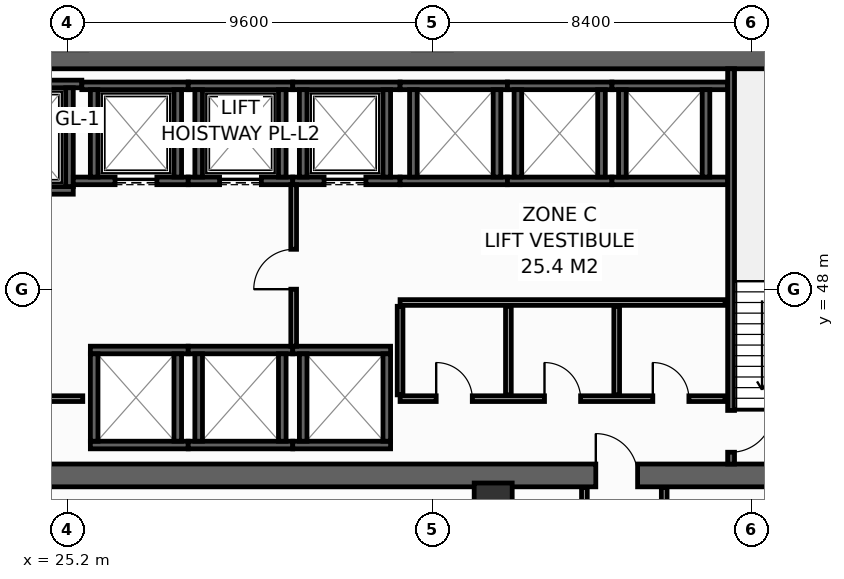
"""IFC4 building model, lengths in metres.
Left out: names, types, materials, properties, quantities, classifications, styles, units other than length and angle.
Written with IfcOpenShell. Run it as: python <this file> out.ifc"""

import sys

from ifc_helpers import new_model, si_unit, direction, frame, frame_2d, origin, origin_2d, place, context, subcontext, project, spatial, rectangle, hollow_rectangle, extrude, element, fill, save


model = new_model("IFC4")
c1 = context("Model", 3, precision=1e-05, world=origin(), true_north=direction((0.0, 1.0)))
c2 = subcontext(c1, "Body", "Model", "MODEL_VIEW")
j1 = project(units=[si_unit("LENGTHUNIT", "METRE"), si_unit("PLANEANGLEUNIT", "RADIAN")], contexts=[c1])
p1 = place(None, origin())
s1 = spatial("IfcSite", under=j1, at=p1, CompositionType="ELEMENT")
p2 = place(p1, origin())
s2 = spatial("IfcBuilding", under=s1, at=p2, CompositionType="ELEMENT")
p3 = place(p2, frame((0.0, 0.0, 110.4)))
s3 = spatial("IfcBuildingStorey", under=s2, at=p3, CompositionType="ELEMENT", Elevation=110.4)
p4 = place(p3, frame((13.5, 43.1, 0.0), z_axis=(0.0, 0.0, 1.0), x_axis=(1.0, 0.0, 0.0)))
e1 = element("IfcWall", 1, at=p4, inside=s3, PredefinedType="SHEAR", context=c2, shape_type="SweptSolid", body=[
    extrude(rectangle(XDim=32.9, YDim=0.6, at=frame_2d((16.45, 0.0))), origin(), (0.0, 0.0, 1.0), 4.15),
])
p5 = place(p4, frame((5.4, 0.0, 0.0)))
e2 = element("IfcOpeningElement", 2, at=p5, cuts=e1, PredefinedType="OPENING", context=c2, shape_type="SweptSolid", body=[
    extrude(rectangle(XDim=1.1, YDim=2.15, at=frame_2d((0.55, 1.075))), frame((0.0, 0.31, 0.0), z_axis=(0.0, -1.0, 0.0), x_axis=(1.0, 0.0, 0.0)), (0.0, 0.0, 1.0), 0.62),
])
p6 = place(p4, frame((25.6, 0.0, 0.0)))
e3 = element("IfcOpeningElement", 3, at=p6, cuts=e1, PredefinedType="OPENING", context=c2, shape_type="SweptSolid", body=[
    extrude(rectangle(XDim=1.1, YDim=2.15, at=frame_2d((0.55, 1.075))), frame((0.0, 0.31, 0.0), z_axis=(0.0, -1.0, 0.0), x_axis=(1.0, 0.0, 0.0)), (0.0, 0.0, 1.0), 0.62),
])
p7 = place(p3, frame((13.5, 54.1, 0.0), z_axis=(0.0, 0.0, 1.0), x_axis=(1.0, 0.0, 0.0)))
e4 = element("IfcWall", 4, at=p7, inside=s3, PredefinedType="SHEAR", context=c2, shape_type="SweptSolid", body=[
    extrude(rectangle(XDim=32.9, YDim=0.6, at=frame_2d((16.45, 0.0))), origin(), (0.0, 0.0, 1.0), 4.15),
])
p8 = place(p3, frame((36.4, 42.4, 0.0), z_axis=(0.0, 0.0, 1.0), x_axis=(1.0, 0.0, 0.0)))
e5 = element("IfcColumn", 5, at=p8, inside=s3, PredefinedType="COLUMN", context=c2, shape_type="SweptSolid", body=[
    extrude(hollow_rectangle(XDim=1.0, YDim=1.0, WallThickness=0.045, at=origin_2d()), origin(), (0.0, 0.0, 1.0), 4.4),
])
p9 = place(p3, frame((22.5, 50.6, 0.0), z_axis=(0.0, 0.0, 1.0), x_axis=(1.0, 0.0, 0.0)))
e6 = element("IfcWall", 6, at=p9, inside=s3, PredefinedType="SHEAR", context=c2, shape_type="SweptSolid", body=[
    extrude(rectangle(XDim=2.85, YDim=0.2, at=frame_2d((1.425, 0.0))), origin(), (0.0, 0.0, 1.0), 4.15),
])
p10 = place(p9, frame((0.925, 0.0, 0.0)))
e7 = element("IfcOpeningElement", 7, at=p10, cuts=e6, PredefinedType="OPENING", context=c2, shape_type="SweptSolid", body=[
    extrude(rectangle(XDim=1.25, YDim=2.3, at=frame_2d((0.625, 1.15))), frame((0.0, 0.11, 0.0), z_axis=(0.0, -1.0, 0.0), x_axis=(1.0, 0.0, 0.0)), (0.0, 0.0, 1.0), 0.22),
])
p11 = place(p3, frame((22.5, 53.4, 0.0), z_axis=(0.0, 0.0, 1.0), x_axis=(1.0, 0.0, 0.0)))
e8 = element("IfcWall", 8, at=p11, inside=s3, PredefinedType="SHEAR", context=c2, shape_type="SweptSolid", body=[
    extrude(rectangle(XDim=3.075, YDim=0.2, at=frame_2d((1.538, 0.0))), origin(), (0.0, 0.0, 1.0), 4.15),
])
p12 = place(p3, frame((25.25, 50.7, 0.0), z_axis=(0.0, 0.0, 1.0), x_axis=(0.0, 1.0, 0.0)))
e9 = element("IfcWall", 9, at=p12, inside=s3, PredefinedType="SHEAR", context=c2, shape_type="SweptSolid", body=[
    extrude(rectangle(XDim=2.6, YDim=0.2, at=frame_2d((1.3, 0.0))), origin(), (0.0, 0.0, 1.0), 4.15),
])
p13 = place(p3, frame((25.35, 50.85, 0.0), z_axis=(0.0, 0.0, 1.0), x_axis=(1.0, 0.0, 0.0)))
e10 = element("IfcWall", 10, at=p13, inside=s3, PredefinedType="SHEAR", context=c2, shape_type="SweptSolid", body=[
    extrude(rectangle(XDim=3.025, YDim=0.2, at=frame_2d((1.512, 0.0))), origin(), (0.0, 0.0, 1.0), 4.15),
])
p14 = place(p13, frame((1.1, 0.0, 0.0)))
e11 = element("IfcOpeningElement", 11, at=p14, cuts=e10, PredefinedType="OPENING", context=c2, shape_type="SweptSolid", body=[
    extrude(rectangle(XDim=1.1, YDim=2.2, at=frame_2d((0.55, 1.1))), frame((0.0, 0.11, 0.0), z_axis=(0.0, -1.0, 0.0), x_axis=(1.0, 0.0, 0.0)), (0.0, 0.0, 1.0), 0.22),
])
p15 = place(p3, frame((25.575, 53.35, 0.0), z_axis=(0.0, 0.0, 1.0), x_axis=(1.0, 0.0, 0.0)))
e12 = element("IfcWall", 12, at=p15, inside=s3, PredefinedType="SHEAR", context=c2, shape_type="SweptSolid", body=[
    extrude(rectangle(XDim=2.8, YDim=0.2, at=frame_2d((1.4, 0.0))), origin(), (0.0, 0.0, 1.0), 4.15),
])
for number, where, z_axis, x_axis in (
    (13, (25.9, 50.95, 0.0), (0.0, 0.0, 1.0), (0.0, 1.0, 0.0)),
    (14, (28.1, 50.95, 0.0), (0.0, 0.0, 1.0), (0.0, 1.0, 0.0)),
):
    element("IfcWall", number, at=place(p3, frame(where, z_axis=z_axis, x_axis=x_axis)), inside=s3, PredefinedType="SHEAR", context=c2, shape_type="SweptSolid", body=[
        extrude(rectangle(XDim=2.3, YDim=0.2, at=frame_2d((1.15, 0.0))), origin(), (0.0, 0.0, 1.0), 4.15),
    ])
p16 = place(p3, frame((28.375, 50.85, 0.0), z_axis=(0.0, 0.0, 1.0), x_axis=(1.0, 0.0, 0.0)))
e15 = element("IfcWall", 15, at=p16, inside=s3, PredefinedType="SHEAR", context=c2, shape_type="SweptSolid", body=[
    extrude(rectangle(XDim=2.75, YDim=0.2, at=frame_2d((1.375, 0.0))), origin(), (0.0, 0.0, 1.0), 4.15),
])
p17 = place(p16, frame((0.825, 0.0, 0.0)))
e16 = element("IfcOpeningElement", 16, at=p17, cuts=e15, PredefinedType="OPENING", context=c2, shape_type="SweptSolid", body=[
    extrude(rectangle(XDim=1.1, YDim=2.2, at=frame_2d((0.55, 1.1))), frame((0.0, 0.11, 0.0), z_axis=(0.0, -1.0, 0.0), x_axis=(1.0, 0.0, 0.0)), (0.0, 0.0, 1.0), 0.22),
])
p18 = place(p3, frame((28.375, 53.35, 0.0), z_axis=(0.0, 0.0, 1.0), x_axis=(1.0, 0.0, 0.0)))
e17 = element("IfcWall", 17, at=p18, inside=s3, PredefinedType="SHEAR", context=c2, shape_type="SweptSolid", body=[
    extrude(rectangle(XDim=2.75, YDim=0.2, at=frame_2d((1.375, 0.0))), origin(), (0.0, 0.0, 1.0), 4.15),
])
for number, where, z_axis, x_axis in (
    (18, (28.65, 50.95, 0.0), (0.0, 0.0, 1.0), (0.0, 1.0, 0.0)),
    (19, (30.85, 50.95, 0.0), (0.0, 0.0, 1.0), (0.0, 1.0, 0.0)),
):
    element("IfcWall", number, at=place(p3, frame(where, z_axis=z_axis, x_axis=x_axis)), inside=s3, PredefinedType="SHEAR", context=c2, shape_type="SweptSolid", body=[
        extrude(rectangle(XDim=2.3, YDim=0.2, at=frame_2d((1.15, 0.0))), origin(), (0.0, 0.0, 1.0), 4.15),
    ])
p19 = place(p3, frame((31.125, 50.85, 0.0), z_axis=(0.0, 0.0, 1.0), x_axis=(1.0, 0.0, 0.0)))
e20 = element("IfcWall", 20, at=p19, inside=s3, PredefinedType="SHEAR", context=c2, shape_type="SweptSolid", body=[
    extrude(rectangle(XDim=2.825, YDim=0.2, at=frame_2d((1.413, 0.0))), origin(), (0.0, 0.0, 1.0), 4.15),
])
p20 = place(p19, frame((0.825, 0.0, 0.0)))
e21 = element("IfcOpeningElement", 21, at=p20, cuts=e20, PredefinedType="OPENING", context=c2, shape_type="SweptSolid", body=[
    extrude(rectangle(XDim=1.1, YDim=2.2, at=frame_2d((0.55, 1.1))), frame((0.0, 0.11, 0.0), z_axis=(0.0, -1.0, 0.0), x_axis=(1.0, 0.0, 0.0)), (0.0, 0.0, 1.0), 0.22),
])
p21 = place(p3, frame((31.125, 53.35, 0.0), z_axis=(0.0, 0.0, 1.0), x_axis=(1.0, 0.0, 0.0)))
e22 = element("IfcWall", 22, at=p21, inside=s3, PredefinedType="SHEAR", context=c2, shape_type="SweptSolid", body=[
    extrude(rectangle(XDim=2.825, YDim=0.2, at=frame_2d((1.413, 0.0))), origin(), (0.0, 0.0, 1.0), 4.15),
])
for number, where, z_axis, x_axis in (
    (23, (31.4, 50.95, 0.0), (0.0, 0.0, 1.0), (0.0, 1.0, 0.0)),
    (24, (33.6, 50.95, 0.0), (0.0, 0.0, 1.0), (0.0, 1.0, 0.0)),
):
    element("IfcWall", number, at=place(p3, frame(where, z_axis=z_axis, x_axis=x_axis)), inside=s3, PredefinedType="SHEAR", context=c2, shape_type="SweptSolid", body=[
        extrude(rectangle(XDim=2.3, YDim=0.2, at=frame_2d((1.15, 0.0))), origin(), (0.0, 0.0, 1.0), 4.15),
    ])
for number, where, z_axis, x_axis in (
    (25, (25.8, 43.9, 0.0), (0.0, 0.0, 1.0), (1.0, 0.0, 0.0)),
    (26, (25.8, 46.4, 0.0), (0.0, 0.0, 1.0), (1.0, 0.0, 0.0)),
):
    element("IfcWall", number, at=place(p3, frame(where, z_axis=z_axis, x_axis=x_axis)), inside=s3, PredefinedType="SHEAR", context=c2, shape_type="SweptSolid", body=[
        extrude(rectangle(XDim=2.575, YDim=0.2, at=frame_2d((1.288, 0.0))), origin(), (0.0, 0.0, 1.0), 4.15),
    ])
for number, where, z_axis, x_axis in (
    (27, (25.9, 44.0, 0.0), (0.0, 0.0, 1.0), (0.0, 1.0, 0.0)),
    (28, (28.1, 44.0, 0.0), (0.0, 0.0, 1.0), (0.0, 1.0, 0.0)),
):
    element("IfcWall", number, at=place(p3, frame(where, z_axis=z_axis, x_axis=x_axis)), inside=s3, PredefinedType="SHEAR", context=c2, shape_type="SweptSolid", body=[
        extrude(rectangle(XDim=2.3, YDim=0.2, at=frame_2d((1.15, 0.0))), origin(), (0.0, 0.0, 1.0), 4.15),
    ])
for number, where, z_axis, x_axis in (
    (29, (28.375, 43.9, 0.0), (0.0, 0.0, 1.0), (1.0, 0.0, 0.0)),
    (30, (28.375, 46.4, 0.0), (0.0, 0.0, 1.0), (1.0, 0.0, 0.0)),
):
    element("IfcWall", number, at=place(p3, frame(where, z_axis=z_axis, x_axis=x_axis)), inside=s3, PredefinedType="SHEAR", context=c2, shape_type="SweptSolid", body=[
        extrude(rectangle(XDim=2.75, YDim=0.2, at=frame_2d((1.375, 0.0))), origin(), (0.0, 0.0, 1.0), 4.15),
    ])
for number, where, z_axis, x_axis in (
    (31, (28.65, 44.0, 0.0), (0.0, 0.0, 1.0), (0.0, 1.0, 0.0)),
    (32, (30.85, 44.0, 0.0), (0.0, 0.0, 1.0), (0.0, 1.0, 0.0)),
):
    element("IfcWall", number, at=place(p3, frame(where, z_axis=z_axis, x_axis=x_axis)), inside=s3, PredefinedType="SHEAR", context=c2, shape_type="SweptSolid", body=[
        extrude(rectangle(XDim=2.3, YDim=0.2, at=frame_2d((1.15, 0.0))), origin(), (0.0, 0.0, 1.0), 4.15),
    ])
for number, where, z_axis, x_axis in (
    (33, (31.125, 43.9, 0.0), (0.0, 0.0, 1.0), (1.0, 0.0, 0.0)),
    (34, (31.125, 46.4, 0.0), (0.0, 0.0, 1.0), (1.0, 0.0, 0.0)),
):
    element("IfcWall", number, at=place(p3, frame(where, z_axis=z_axis, x_axis=x_axis)), inside=s3, PredefinedType="SHEAR", context=c2, shape_type="SweptSolid", body=[
        extrude(rectangle(XDim=2.575, YDim=0.2, at=frame_2d((1.288, 0.0))), origin(), (0.0, 0.0, 1.0), 4.15),
    ])
for number, where, z_axis, x_axis in (
    (35, (31.4, 44.0, 0.0), (0.0, 0.0, 1.0), (0.0, 1.0, 0.0)),
    (36, (33.6, 44.0, 0.0), (0.0, 0.0, 1.0), (0.0, 1.0, 0.0)),
):
    element("IfcWall", number, at=place(p3, frame(where, z_axis=z_axis, x_axis=x_axis)), inside=s3, PredefinedType="SHEAR", context=c2, shape_type="SweptSolid", body=[
        extrude(rectangle(XDim=2.3, YDim=0.2, at=frame_2d((1.15, 0.0))), origin(), (0.0, 0.0, 1.0), 4.15),
    ])
for number, where, z_axis, x_axis in (
    (37, (33.95, 50.85, 0.0), (0.0, 0.0, 1.0), (1.0, 0.0, 0.0)),
    (38, (33.95, 53.35, 0.0), (0.0, 0.0, 1.0), (1.0, 0.0, 0.0)),
):
    element("IfcWall", number, at=place(p3, frame(where, z_axis=z_axis, x_axis=x_axis)), inside=s3, PredefinedType="SHEAR", context=c2, shape_type="SweptSolid", body=[
        extrude(rectangle(XDim=2.825, YDim=0.2, at=frame_2d((1.413, 0.0))), origin(), (0.0, 0.0, 1.0), 4.15),
    ])
for number, where, z_axis, x_axis in (
    (39, (34.3, 50.95, 0.0), (0.0, 0.0, 1.0), (0.0, 1.0, 0.0)),
    (40, (36.5, 50.95, 0.0), (0.0, 0.0, 1.0), (0.0, 1.0, 0.0)),
):
    element("IfcWall", number, at=place(p3, frame(where, z_axis=z_axis, x_axis=x_axis)), inside=s3, PredefinedType="SHEAR", context=c2, shape_type="SweptSolid", body=[
        extrude(rectangle(XDim=2.3, YDim=0.2, at=frame_2d((1.15, 0.0))), origin(), (0.0, 0.0, 1.0), 4.15),
    ])
for number, where, z_axis, x_axis in (
    (41, (36.775, 50.85, 0.0), (0.0, 0.0, 1.0), (1.0, 0.0, 0.0)),
    (42, (36.775, 53.35, 0.0), (0.0, 0.0, 1.0), (1.0, 0.0, 0.0)),
):
    element("IfcWall", number, at=place(p3, frame(where, z_axis=z_axis, x_axis=x_axis)), inside=s3, PredefinedType="SHEAR", context=c2, shape_type="SweptSolid", body=[
        extrude(rectangle(XDim=2.75, YDim=0.2, at=frame_2d((1.375, 0.0))), origin(), (0.0, 0.0, 1.0), 4.15),
    ])
for number, where, z_axis, x_axis in (
    (43, (37.05, 50.95, 0.0), (0.0, 0.0, 1.0), (0.0, 1.0, 0.0)),
    (44, (39.25, 50.95, 0.0), (0.0, 0.0, 1.0), (0.0, 1.0, 0.0)),
):
    element("IfcWall", number, at=place(p3, frame(where, z_axis=z_axis, x_axis=x_axis)), inside=s3, PredefinedType="SHEAR", context=c2, shape_type="SweptSolid", body=[
        extrude(rectangle(XDim=2.3, YDim=0.2, at=frame_2d((1.15, 0.0))), origin(), (0.0, 0.0, 1.0), 4.15),
    ])
for number, where, z_axis, x_axis in (
    (45, (39.525, 50.85, 0.0), (0.0, 0.0, 1.0), (1.0, 0.0, 0.0)),
    (46, (39.525, 53.35, 0.0), (0.0, 0.0, 1.0), (1.0, 0.0, 0.0)),
):
    element("IfcWall", number, at=place(p3, frame(where, z_axis=z_axis, x_axis=x_axis)), inside=s3, PredefinedType="SHEAR", context=c2, shape_type="SweptSolid", body=[
        extrude(rectangle(XDim=3.045, YDim=0.2, at=frame_2d((1.522, 0.0))), origin(), (0.0, 0.0, 1.0), 4.15),
    ])
for number, where, z_axis, x_axis in (
    (47, (39.8, 50.95, 0.0), (0.0, 0.0, 1.0), (0.0, 1.0, 0.0)),
    (48, (42.0, 50.95, 0.0), (0.0, 0.0, 1.0), (0.0, 1.0, 0.0)),
):
    element("IfcWall", number, at=place(p3, frame(where, z_axis=z_axis, x_axis=x_axis)), inside=s3, PredefinedType="SHEAR", context=c2, shape_type="SweptSolid", body=[
        extrude(rectangle(XDim=2.3, YDim=0.2, at=frame_2d((1.15, 0.0))), origin(), (0.0, 0.0, 1.0), 4.15),
    ])
p22 = place(p3, frame((42.66, 53.8, 0.0), z_axis=(0.0, 0.0, 1.0), x_axis=(0.0, -1.0, 0.0)))
e49 = element("IfcWall", 49, at=p22, inside=s3, PredefinedType="SHEAR", context=c2, shape_type="SweptSolid", body=[
    extrude(rectangle(XDim=10.4, YDim=0.18, at=frame_2d((5.2, 0.0))), origin(), (0.0, 0.0, 1.0), 4.15),
])
p23 = place(p22, frame((8.99, 0.0, 0.0)))
e50 = element("IfcOpeningElement", 50, at=p23, cuts=e49, PredefinedType="OPENING", context=c2, shape_type="SweptSolid", body=[
    extrude(rectangle(XDim=1.1, YDim=2.15, at=frame_2d((0.55, 1.075))), frame((0.0, 0.1, 0.0), z_axis=(0.0, -1.0, 0.0), x_axis=(1.0, 0.0, 0.0)), (0.0, 0.0, 1.0), 0.2),
])
p24 = place(p3, frame((22.68, 45.12, 0.0), z_axis=(0.0, 0.0, 1.0), x_axis=(1.0, 0.0, 0.0)))
e51 = element("IfcWall", 51, at=p24, inside=s3, PredefinedType="PARTITIONING", context=c2, shape_type="SweptSolid", body=[
    extrude(rectangle(XDim=2.92, YDim=0.15, at=frame_2d((1.46, 0.0))), origin(), (0.0, 0.0, 1.0), 4.15),
])
p25 = place(p24, frame((0.85, 0.0, 0.0)))
e52 = element("IfcOpeningElement", 52, at=p25, cuts=e51, PredefinedType="OPENING", context=c2, shape_type="SweptSolid", body=[
    extrude(rectangle(XDim=1.1, YDim=2.15, at=frame_2d((0.55, 1.075))), frame((0.0, 0.085, 0.0), z_axis=(0.0, -1.0, 0.0), x_axis=(1.0, 0.0, 0.0)), (0.0, 0.0, 1.0), 0.17),
])
p26 = place(p3, frame((31.15, 46.5, 0.0), z_axis=(0.0, 0.0, 1.0), x_axis=(0.0, 1.0, 0.0)))
e53 = element("IfcWall", 53, at=p26, inside=s3, PredefinedType="PARTITIONING", context=c2, shape_type="SweptSolid", body=[
    extrude(rectangle(XDim=4.25, YDim=0.15, at=frame_2d((2.125, 0.0))), origin(), (0.0, 0.0, 1.0), 4.15),
])
p27 = place(p26, frame((1.5, 0.0, 0.0)))
e54 = element("IfcOpeningElement", 54, at=p27, cuts=e53, PredefinedType="OPENING", context=c2, shape_type="SweptSolid", body=[
    extrude(rectangle(XDim=1.05, YDim=2.15, at=frame_2d((0.525, 1.075))), frame((0.0, 0.085, 0.0), z_axis=(0.0, -1.0, 0.0), x_axis=(1.0, 0.0, 0.0)), (0.0, 0.0, 1.0), 0.17),
])
p28 = place(p3, frame((33.95, 45.12, 0.0), z_axis=(0.0, 0.0, 1.0), x_axis=(1.0, 0.0, 0.0)))
e55 = element("IfcWall", 55, at=p28, inside=s3, PredefinedType="PARTITIONING", context=c2, shape_type="SweptSolid", body=[
    extrude(rectangle(XDim=8.55, YDim=0.15, at=frame_2d((4.275, 0.0))), origin(), (0.0, 0.0, 1.0), 4.15),
])
p29 = place(p28, frame((0.95, 0.0, 0.0)))
e56 = element("IfcOpeningElement", 56, at=p29, cuts=e55, PredefinedType="OPENING", context=c2, shape_type="SweptSolid", body=[
    extrude(rectangle(XDim=0.95, YDim=2.15, at=frame_2d((0.475, 1.075))), frame((0.0, 0.085, 0.0), z_axis=(0.0, -1.0, 0.0), x_axis=(1.0, 0.0, 0.0)), (0.0, 0.0, 1.0), 0.17),
])
p30 = place(p28, frame((3.8, 0.0, 0.0)))
e57 = element("IfcOpeningElement", 57, at=p30, cuts=e55, PredefinedType="OPENING", context=c2, shape_type="SweptSolid", body=[
    extrude(rectangle(XDim=0.95, YDim=2.15, at=frame_2d((0.475, 1.075))), frame((0.0, 0.085, 0.0), z_axis=(0.0, -1.0, 0.0), x_axis=(1.0, 0.0, 0.0)), (0.0, 0.0, 1.0), 0.17),
])
p31 = place(p28, frame((6.65, 0.0, 0.0)))
e58 = element("IfcOpeningElement", 58, at=p31, cuts=e55, PredefinedType="OPENING", context=c2, shape_type="SweptSolid", body=[
    extrude(rectangle(XDim=0.95, YDim=2.15, at=frame_2d((0.475, 1.075))), frame((0.0, 0.085, 0.0), z_axis=(0.0, -1.0, 0.0), x_axis=(1.0, 0.0, 0.0)), (0.0, 0.0, 1.0), 0.17),
])
p32 = place(p3, frame((33.95, 47.65, 0.0), z_axis=(0.0, 0.0, 1.0), x_axis=(1.0, 0.0, 0.0)))
e59 = element("IfcWall", 59, at=p32, inside=s3, PredefinedType="PARTITIONING", context=c2, shape_type="SweptSolid", body=[
    extrude(rectangle(XDim=8.55, YDim=0.15, at=frame_2d((4.275, 0.0))), origin(), (0.0, 0.0, 1.0), 4.15),
])
for number, where, z_axis, x_axis in (
    (60, (33.95, 45.22, 0.0), (0.0, 0.0, 1.0), (0.0, 1.0, 0.0)),
    (61, (36.8, 45.22, 0.0), (0.0, 0.0, 1.0), (0.0, 1.0, 0.0)),
    (62, (39.65, 45.22, 0.0), (0.0, 0.0, 1.0), (0.0, 1.0, 0.0)),
):
    element("IfcWall", number, at=place(p3, frame(where, z_axis=z_axis, x_axis=x_axis)), inside=s3, PredefinedType="PARTITIONING", context=c2, shape_type="SweptSolid", body=[
        extrude(rectangle(XDim=2.33, YDim=0.15, at=frame_2d((1.165, 0.0))), origin(), (0.0, 0.0, 1.0), 4.15),
    ])
for number, where, z_axis, x_axis in (
    (63, (38.8, 41.15, 0.0), (0.0, 0.0, 1.0), (0.0, 1.0, 0.0)),
    (64, (40.9, 41.15, 0.0), (0.0, 0.0, 1.0), (0.0, 1.0, 0.0)),
):
    element("IfcWall", number, at=place(p3, frame(where, z_axis=z_axis, x_axis=x_axis)), inside=s3, PredefinedType="PARTITIONING", context=c2, shape_type="SweptSolid", body=[
        extrude(rectangle(XDim=1.63, YDim=0.15, at=frame_2d((0.815, 0.0))), origin(), (0.0, 0.0, 1.0), 4.15),
    ])
p33 = place(p14, origin())
e65 = element("IfcDoor", 65, at=p33, inside=s3, OperationType="SLIDING_TO_LEFT", PredefinedType="DOOR", context=c2, shape_type="SweptSolid", body=[
    extrude(rectangle(XDim=1.1, YDim=2.2, at=frame_2d((0.55, 1.1))), frame((0.0, 0.025, 0.0), z_axis=(0.0, -1.0, 0.0), x_axis=(1.0, 0.0, 0.0)), (0.0, 0.0, 1.0), 0.05),
])
fill(e11, e65)
p34 = place(p17, origin())
e66 = element("IfcDoor", 66, at=p34, inside=s3, OperationType="SLIDING_TO_LEFT", PredefinedType="DOOR", context=c2, shape_type="SweptSolid", body=[
    extrude(rectangle(XDim=1.1, YDim=2.2, at=frame_2d((0.55, 1.1))), frame((0.0, 0.025, 0.0), z_axis=(0.0, -1.0, 0.0), x_axis=(1.0, 0.0, 0.0)), (0.0, 0.0, 1.0), 0.05),
])
fill(e16, e66)
p35 = place(p20, origin())
e67 = element("IfcDoor", 67, at=p35, inside=s3, OperationType="SLIDING_TO_LEFT", PredefinedType="DOOR", context=c2, shape_type="SweptSolid", body=[
    extrude(rectangle(XDim=1.1, YDim=2.2, at=frame_2d((0.55, 1.1))), frame((0.0, 0.025, 0.0), z_axis=(0.0, -1.0, 0.0), x_axis=(1.0, 0.0, 0.0)), (0.0, 0.0, 1.0), 0.05),
])
fill(e21, e67)
p36 = place(p23, origin())
e68 = element("IfcDoor", 68, at=p36, inside=s3, OperationType="SINGLE_SWING_LEFT", PredefinedType="DOOR", context=c2, shape_type="SweptSolid", body=[
    extrude(rectangle(XDim=1.1, YDim=2.15, at=frame_2d((0.55, 1.075))), frame((0.0, 0.025, 0.0), z_axis=(0.0, -1.0, 0.0), x_axis=(1.0, 0.0, 0.0)), (0.0, 0.0, 1.0), 0.05),
])
fill(e50, e68)
p37 = place(p6, origin())
e69 = element("IfcDoor", 69, at=p37, inside=s3, OperationType="SINGLE_SWING_LEFT", PredefinedType="DOOR", context=c2, shape_type="SweptSolid", body=[
    extrude(rectangle(XDim=1.1, YDim=2.15, at=frame_2d((0.55, 1.075))), frame((0.0, 0.025, 0.0), z_axis=(0.0, -1.0, 0.0), x_axis=(1.0, 0.0, 0.0)), (0.0, 0.0, 1.0), 0.05),
])
fill(e3, e69)
p38 = place(p27, origin())
e70 = element("IfcDoor", 70, at=p38, inside=s3, OperationType="SINGLE_SWING_LEFT", PredefinedType="DOOR", context=c2, shape_type="SweptSolid", body=[
    extrude(rectangle(XDim=1.05, YDim=2.15, at=frame_2d((0.525, 1.075))), frame((0.0, 0.025, 0.0), z_axis=(0.0, -1.0, 0.0), x_axis=(1.0, 0.0, 0.0)), (0.0, 0.0, 1.0), 0.05),
])
fill(e54, e70)
p39 = place(p29, origin())
e71 = element("IfcDoor", 71, at=p39, inside=s3, OperationType="SINGLE_SWING_LEFT", PredefinedType="DOOR", context=c2, shape_type="SweptSolid", body=[
    extrude(rectangle(XDim=0.95, YDim=2.15, at=frame_2d((0.475, 1.075))), frame((0.0, 0.025, 0.0), z_axis=(0.0, -1.0, 0.0), x_axis=(1.0, 0.0, 0.0)), (0.0, 0.0, 1.0), 0.05),
])
fill(e56, e71)
p40 = place(p30, origin())
e72 = element("IfcDoor", 72, at=p40, inside=s3, OperationType="SINGLE_SWING_LEFT", PredefinedType="DOOR", context=c2, shape_type="SweptSolid", body=[
    extrude(rectangle(XDim=0.95, YDim=2.15, at=frame_2d((0.475, 1.075))), frame((0.0, 0.025, 0.0), z_axis=(0.0, -1.0, 0.0), x_axis=(1.0, 0.0, 0.0)), (0.0, 0.0, 1.0), 0.05),
])
fill(e57, e72)
p41 = place(p31, origin())
e73 = element("IfcDoor", 73, at=p41, inside=s3, OperationType="SINGLE_SWING_LEFT", PredefinedType="DOOR", context=c2, shape_type="SweptSolid", body=[
    extrude(rectangle(XDim=0.95, YDim=2.15, at=frame_2d((0.475, 1.075))), frame((0.0, 0.025, 0.0), z_axis=(0.0, -1.0, 0.0), x_axis=(1.0, 0.0, 0.0)), (0.0, 0.0, 1.0), 0.05),
])
fill(e58, e73)
save(model, sys.argv[1])
